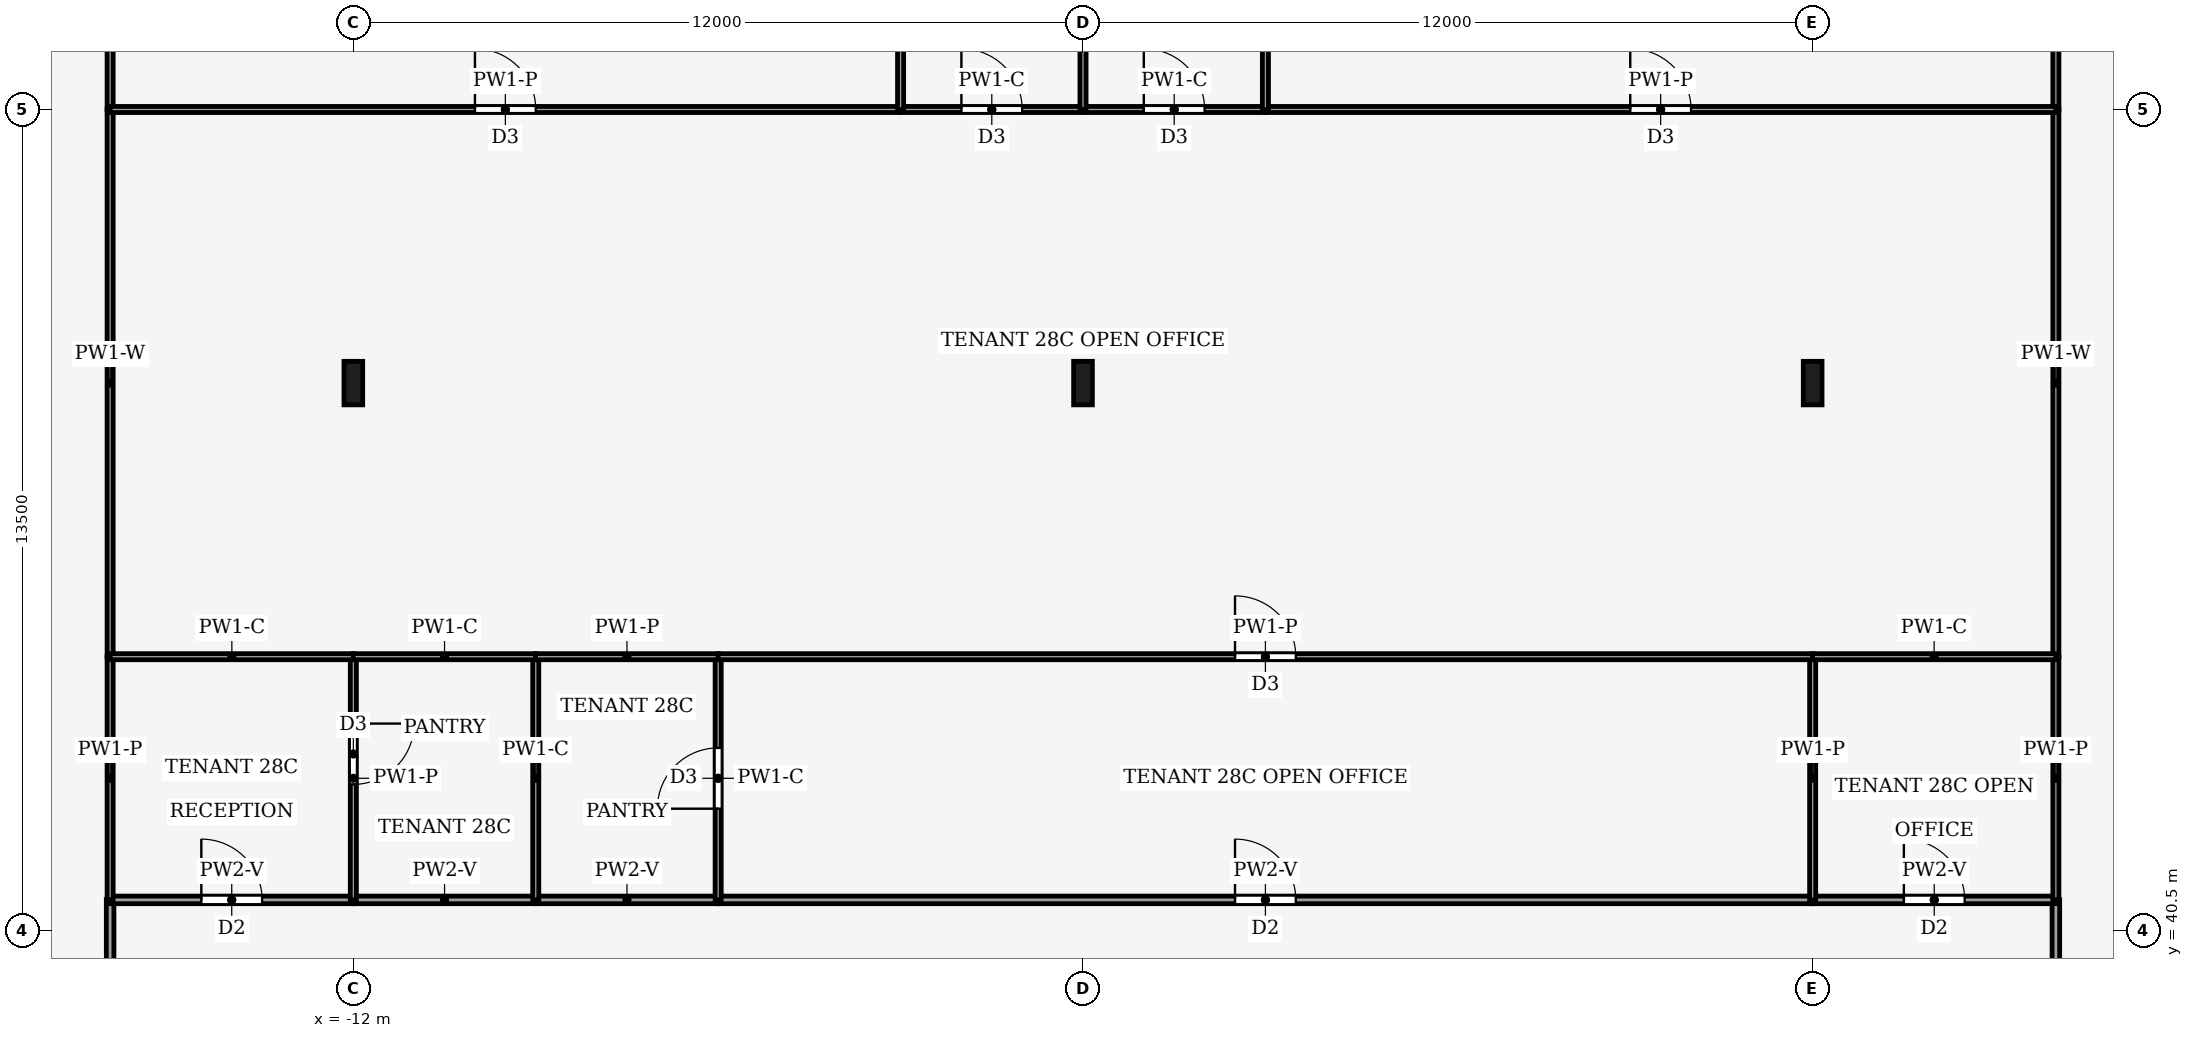
"""IFC4 building model, lengths in metres.
Left out: names, types, materials, properties, quantities, classifications, styles, units other than length and angle.
Written with IfcOpenShell. Run it as: python <this file> out.ifc"""

import sys

from ifc_helpers import new_model, si_unit, direction, frame, frame_2d, origin, origin_2d, place, context, subcontext, project, spatial, rectangle, i_section, extrude, element, fill, save


model = new_model("IFC4")
c1 = context("Model", 3, precision=1e-05, world=origin(), true_north=direction((0.0, 1.0)))
c2 = subcontext(c1, "Body", "Model", "MODEL_VIEW")
j1 = project(units=[si_unit("LENGTHUNIT", "METRE"), si_unit("PLANEANGLEUNIT", "RADIAN")], contexts=[c1])
p1 = place(None, origin())
s1 = spatial("IfcSite", under=j1, at=p1, CompositionType="ELEMENT")
p2 = place(p1, origin())
s2 = spatial("IfcBuilding", under=s1, at=p2, CompositionType="ELEMENT")
p3 = place(p2, frame((0.0, 0.0, 126.0)))
s3 = spatial("IfcBuildingStorey", under=s2, at=p3, CompositionType="ELEMENT", Elevation=126.0)
for number, where, z_axis, x_axis in (
    (1, (-12.0, 49.5, 0.0), (0.0, 0.0, 1.0), (1.0, 0.0, 0.0)),
    (2, (0.0, 49.5, 0.0), (0.0, 0.0, 1.0), (1.0, 0.0, 0.0)),
    (3, (12.0, 49.5, 0.0), (0.0, 0.0, 1.0), (1.0, 0.0, 0.0)),
):
    element("IfcColumn", number, at=place(p3, frame(where, z_axis=z_axis, x_axis=x_axis)), inside=s3, PredefinedType="COLUMN", context=c2, shape_type="SweptSolid", body=[
        extrude(i_section(OverallWidth=0.308, OverallDepth=0.716, WebThickness=0.021, FlangeThickness=0.04, FilletRadius=0.027, at=origin_2d()), origin(), (0.0, 0.0, 1.0), 4.0),
    ])
p4 = place(p3, frame((-16.0, 36.0, 0.0), z_axis=(0.0, 0.0, 1.0), x_axis=(0.0, 1.0, 0.0)))
e4 = element("IfcWall", 4, at=p4, inside=s3, PredefinedType="PARTITIONING", context=c2, shape_type="SweptSolid", body=[
    extrude(rectangle(XDim=5.004, YDim=0.125, at=frame_2d((2.502, 0.0))), origin(), (0.0, 0.0, 1.0), 3.14),
])
p5 = place(p4, frame((2.002, 0.0, 0.0)))
e5 = element("IfcOpeningElement", 5, at=p5, cuts=e4, PredefinedType="OPENING", context=c2, shape_type="SweptSolid", body=[
    extrude(rectangle(XDim=1.0, YDim=2.1, at=frame_2d((0.5, 1.05))), frame((0.0, 0.073, 0.0), z_axis=(0.0, -1.0, 0.0), x_axis=(1.0, 0.0, 0.0)), (0.0, 0.0, 1.0), 0.145),
])
p6 = place(p3, frame((16.0, 41.004, 0.0), z_axis=(0.0, 0.0, 1.0), x_axis=(0.0, -1.0, 0.0)))
e6 = element("IfcWall", 6, at=p6, inside=s3, PredefinedType="PARTITIONING", context=c2, shape_type="SweptSolid", body=[
    extrude(rectangle(XDim=5.004, YDim=0.125, at=frame_2d((2.502, 0.0))), origin(), (0.0, 0.0, 1.0), 3.14),
])
p7 = place(p6, frame((2.002, 0.0, 0.0)))
e7 = element("IfcOpeningElement", 7, at=p7, cuts=e6, PredefinedType="OPENING", context=c2, shape_type="SweptSolid", body=[
    extrude(rectangle(XDim=1.0, YDim=2.1, at=frame_2d((0.5, 1.05))), frame((0.0, 0.073, 0.0), z_axis=(0.0, -1.0, 0.0), x_axis=(1.0, 0.0, 0.0)), (0.0, 0.0, 1.0), 0.145),
])
p8 = place(p3, frame((-16.0, 41.0, 0.0), z_axis=(0.0, 0.0, 1.0), x_axis=(1.0, 0.0, 0.0)))
e8 = element("IfcWall", 8, at=p8, inside=s3, PredefinedType="PARTITIONING", context=c2, shape_type="SweptSolid", body=[
    extrude(rectangle(XDim=4.0, YDim=0.125, at=frame_2d((2.0, 0.0))), origin(), (0.0, 0.0, 1.0), 3.44),
])
p9 = place(p8, frame((1.5, 0.0, 0.0)))
e9 = element("IfcOpeningElement", 9, at=p9, cuts=e8, PredefinedType="OPENING", context=c2, shape_type="SweptSolid", body=[
    extrude(rectangle(XDim=1.0, YDim=2.1, at=frame_2d((0.5, 1.05))), frame((0.0, 0.073, 0.0), z_axis=(0.0, -1.0, 0.0), x_axis=(1.0, 0.0, 0.0)), (0.0, 0.0, 1.0), 0.145),
])
for number, where, z_axis, x_axis in (
    (10, (-9.0, 41.0, 0.0), (0.0, 0.0, 1.0), (-1.0, 0.0, 0.0)),
    (11, (-6.0, 41.0, 0.0), (0.0, 0.0, 1.0), (-1.0, 0.0, 0.0)),
):
    element("IfcWall", number, at=place(p3, frame(where, z_axis=z_axis, x_axis=x_axis)), inside=s3, PredefinedType="PARTITIONING", context=c2, shape_type="SweptSolid", body=[
        extrude(rectangle(XDim=3.0, YDim=0.125, at=frame_2d((1.5, 0.0))), origin(), (0.0, 0.0, 1.0), 3.44),
    ])
p10 = place(p3, frame((-6.0, 41.0, 0.0), z_axis=(0.0, 0.0, 1.0), x_axis=(1.0, 0.0, 0.0)))
e12 = element("IfcWall", 12, at=p10, inside=s3, PredefinedType="PARTITIONING", context=c2, shape_type="SweptSolid", body=[
    extrude(rectangle(XDim=18.0, YDim=0.125, at=frame_2d((9.0, 0.0))), origin(), (0.0, 0.0, 1.0), 3.44),
])
p11 = place(p10, frame((8.5, 0.0, 0.0)))
e13 = element("IfcOpeningElement", 13, at=p11, cuts=e12, PredefinedType="OPENING", context=c2, shape_type="SweptSolid", body=[
    extrude(rectangle(XDim=1.0, YDim=2.1, at=frame_2d((0.5, 1.05))), frame((0.0, 0.073, 0.0), z_axis=(0.0, -1.0, 0.0), x_axis=(1.0, 0.0, 0.0)), (0.0, 0.0, 1.0), 0.145),
])
p12 = place(p3, frame((12.0, 41.0, 0.0), z_axis=(0.0, 0.0, 1.0), x_axis=(1.0, 0.0, 0.0)))
e14 = element("IfcWall", 14, at=p12, inside=s3, PredefinedType="PARTITIONING", context=c2, shape_type="SweptSolid", body=[
    extrude(rectangle(XDim=4.0, YDim=0.125, at=frame_2d((2.0, 0.0))), origin(), (0.0, 0.0, 1.0), 3.44),
])
p13 = place(p12, frame((1.5, 0.0, 0.0)))
e15 = element("IfcOpeningElement", 15, at=p13, cuts=e14, PredefinedType="OPENING", context=c2, shape_type="SweptSolid", body=[
    extrude(rectangle(XDim=1.0, YDim=2.1, at=frame_2d((0.5, 1.05))), frame((0.0, 0.073, 0.0), z_axis=(0.0, -1.0, 0.0), x_axis=(1.0, 0.0, 0.0)), (0.0, 0.0, 1.0), 0.145),
])
p14 = place(p3, frame((-16.0, 41.0, 0.0), z_axis=(0.0, 0.0, 1.0), x_axis=(0.0, 1.0, 0.0)))
e16 = element("IfcWall", 16, at=p14, inside=s3, PredefinedType="PARTITIONING", context=c2, shape_type="SweptSolid", body=[
    extrude(rectangle(XDim=4.0, YDim=0.1, at=frame_2d((2.0, 0.0))), origin(), (0.0, 0.0, 1.0), 3.44),
])
p15 = place(p3, frame((-16.0, 45.0, 0.0), z_axis=(0.0, 0.0, 1.0), x_axis=(0.0, 1.0, 0.0)))
e17 = element("IfcWall", 17, at=p15, inside=s3, PredefinedType="PARTITIONING", context=c2, shape_type="SweptSolid", body=[
    extrude(rectangle(XDim=9.0, YDim=0.1, at=frame_2d((4.5, 0.0))), origin(), (0.0, 0.0, 1.0), 3.24),
])
p16 = place(p3, frame((-16.0, 54.0, 0.0), z_axis=(0.0, 0.0, 1.0), x_axis=(0.0, 1.0, 0.0)))
e18 = element("IfcWall", 18, at=p16, inside=s3, PredefinedType="PARTITIONING", context=c2, shape_type="SweptSolid", body=[
    extrude(rectangle(XDim=6.913, YDim=0.1, at=frame_2d((3.457, 0.0))), origin(), (0.0, 0.0, 1.0), 3.04),
])
p17 = place(p3, frame((16.0, 45.0, 0.0), z_axis=(0.0, 0.0, 1.0), x_axis=(0.0, -1.0, 0.0)))
e19 = element("IfcWall", 19, at=p17, inside=s3, PredefinedType="PARTITIONING", context=c2, shape_type="SweptSolid", body=[
    extrude(rectangle(XDim=4.0, YDim=0.1, at=frame_2d((2.0, 0.0))), origin(), (0.0, 0.0, 1.0), 3.44),
])
p18 = place(p3, frame((16.0, 54.0, 0.0), z_axis=(0.0, 0.0, 1.0), x_axis=(0.0, -1.0, 0.0)))
e20 = element("IfcWall", 20, at=p18, inside=s3, PredefinedType="PARTITIONING", context=c2, shape_type="SweptSolid", body=[
    extrude(rectangle(XDim=9.0, YDim=0.1, at=frame_2d((4.5, 0.0))), origin(), (0.0, 0.0, 1.0), 3.24),
])
p19 = place(p3, frame((16.0, 60.913, 0.0), z_axis=(0.0, 0.0, 1.0), x_axis=(0.0, -1.0, 0.0)))
e21 = element("IfcWall", 21, at=p19, inside=s3, PredefinedType="PARTITIONING", context=c2, shape_type="SweptSolid", body=[
    extrude(rectangle(XDim=6.913, YDim=0.1, at=frame_2d((3.457, 0.0))), origin(), (0.0, 0.0, 1.0), 3.04),
])
p20 = place(p3, frame((-12.0, 45.0, 0.0), z_axis=(0.0, 0.0, 1.0), x_axis=(0.0, -1.0, 0.0)))
e22 = element("IfcWall", 22, at=p20, inside=s3, PredefinedType="PARTITIONING", context=c2, shape_type="SweptSolid", body=[
    extrude(rectangle(XDim=4.0, YDim=0.1, at=frame_2d((2.0, 0.0))), origin(), (0.0, 0.0, 1.0), 3.44),
])
p21 = place(p20, frame((1.1, 0.0, 0.0)))
e23 = element("IfcOpeningElement", 23, at=p21, cuts=e22, PredefinedType="OPENING", context=c2, shape_type="SweptSolid", body=[
    extrude(rectangle(XDim=1.0, YDim=2.1, at=frame_2d((0.5, 1.05))), frame((0.0, 0.06, 0.0), z_axis=(0.0, -1.0, 0.0), x_axis=(1.0, 0.0, 0.0)), (0.0, 0.0, 1.0), 0.12),
])
p22 = place(p3, frame((-11.996, 45.0, 0.0), z_axis=(0.0, 0.0, 1.0), x_axis=(-1.0, 0.0, 0.0)))
e24 = element("IfcWall", 24, at=p22, inside=s3, PredefinedType="PARTITIONING", context=c2, shape_type="SweptSolid", body=[
    extrude(rectangle(XDim=4.004, YDim=0.1, at=frame_2d((2.002, 0.0))), origin(), (0.0, 0.0, 1.0), 3.87),
])
p23 = place(p3, frame((-9.0, 41.0, 0.0), z_axis=(0.0, 0.0, 1.0), x_axis=(0.0, 1.0, 0.0)))
e25 = element("IfcWall", 25, at=p23, inside=s3, PredefinedType="PARTITIONING", context=c2, shape_type="SweptSolid", body=[
    extrude(rectangle(XDim=4.0, YDim=0.1, at=frame_2d((2.0, 0.0))), origin(), (0.0, 0.0, 1.0), 3.87),
])
p24 = place(p3, frame((-8.996, 45.0, 0.0), z_axis=(0.0, 0.0, 1.0), x_axis=(-1.0, 0.0, 0.0)))
e26 = element("IfcWall", 26, at=p24, inside=s3, PredefinedType="PARTITIONING", context=c2, shape_type="SweptSolid", body=[
    extrude(rectangle(XDim=3.008, YDim=0.1, at=frame_2d((1.504, 0.0))), origin(), (0.0, 0.0, 1.0), 3.87),
])
p25 = place(p3, frame((-6.0, 41.0, 0.0), z_axis=(0.0, 0.0, 1.0), x_axis=(0.0, 1.0, 0.0)))
e27 = element("IfcWall", 27, at=p25, inside=s3, PredefinedType="PARTITIONING", context=c2, shape_type="SweptSolid", body=[
    extrude(rectangle(XDim=4.0, YDim=0.1, at=frame_2d((2.0, 0.0))), origin(), (0.0, 0.0, 1.0), 3.87),
])
p26 = place(p25, frame((1.5, 0.0, 0.0)))
e28 = element("IfcOpeningElement", 28, at=p26, cuts=e27, PredefinedType="OPENING", context=c2, shape_type="SweptSolid", body=[
    extrude(rectangle(XDim=1.0, YDim=2.1, at=frame_2d((0.5, 1.05))), frame((0.0, 0.06, 0.0), z_axis=(0.0, -1.0, 0.0), x_axis=(1.0, 0.0, 0.0)), (0.0, 0.0, 1.0), 0.12),
])
p27 = place(p3, frame((-5.996, 45.0, 0.0), z_axis=(0.0, 0.0, 1.0), x_axis=(-1.0, 0.0, 0.0)))
e29 = element("IfcWall", 29, at=p27, inside=s3, PredefinedType="PARTITIONING", context=c2, shape_type="SweptSolid", body=[
    extrude(rectangle(XDim=3.008, YDim=0.1, at=frame_2d((1.504, 0.0))), origin(), (0.0, 0.0, 1.0), 3.44),
])
p28 = place(p3, frame((12.0, 41.0, 0.0), z_axis=(0.0, 0.0, 1.0), x_axis=(0.0, 1.0, 0.0)))
e30 = element("IfcWall", 30, at=p28, inside=s3, PredefinedType="PARTITIONING", context=c2, shape_type="SweptSolid", body=[
    extrude(rectangle(XDim=4.0, YDim=0.1, at=frame_2d((2.0, 0.0))), origin(), (0.0, 0.0, 1.0), 3.44),
])
p29 = place(p3, frame((-6.004, 45.0, 0.0), z_axis=(0.0, 0.0, 1.0), x_axis=(1.0, 0.0, 0.0)))
e31 = element("IfcWall", 31, at=p29, inside=s3, PredefinedType="PARTITIONING", context=c2, shape_type="SweptSolid", body=[
    extrude(rectangle(XDim=18.008, YDim=0.1, at=frame_2d((9.004, 0.0))), origin(), (0.0, 0.0, 1.0), 3.44),
])
p30 = place(p29, frame((8.504, 0.0, 0.0)))
e32 = element("IfcOpeningElement", 32, at=p30, cuts=e31, PredefinedType="OPENING", context=c2, shape_type="SweptSolid", body=[
    extrude(rectangle(XDim=1.0, YDim=2.1, at=frame_2d((0.5, 1.05))), frame((0.0, 0.06, 0.0), z_axis=(0.0, -1.0, 0.0), x_axis=(1.0, 0.0, 0.0)), (0.0, 0.0, 1.0), 0.12),
])
p31 = place(p3, frame((16.0, 45.0, 0.0), z_axis=(0.0, 0.0, 1.0), x_axis=(-1.0, 0.0, 0.0)))
e33 = element("IfcWall", 33, at=p31, inside=s3, PredefinedType="PARTITIONING", context=c2, shape_type="SweptSolid", body=[
    extrude(rectangle(XDim=4.004, YDim=0.1, at=frame_2d((2.002, 0.0))), origin(), (0.0, 0.0, 1.0), 3.87),
])
p32 = place(p3, frame((-16.0, 54.0, 0.0), z_axis=(0.0, 0.0, 1.0), x_axis=(1.0, 0.0, 0.0)))
e34 = element("IfcWall", 34, at=p32, inside=s3, PredefinedType="PARTITIONING", context=c2, shape_type="SweptSolid", body=[
    extrude(rectangle(XDim=13.0, YDim=0.1, at=frame_2d((6.5, 0.0))), origin(), (0.0, 0.0, 1.0), 3.44),
])
p33 = place(p32, frame((6.0, 0.0, 0.0)))
e35 = element("IfcOpeningElement", 35, at=p33, cuts=e34, PredefinedType="OPENING", context=c2, shape_type="SweptSolid", body=[
    extrude(rectangle(XDim=1.0, YDim=2.1, at=frame_2d((0.5, 1.05))), frame((0.0, 0.06, 0.0), z_axis=(0.0, -1.0, 0.0), x_axis=(1.0, 0.0, 0.0)), (0.0, 0.0, 1.0), 0.12),
])
p34 = place(p3, frame((-3.0, 54.0, 0.0), z_axis=(0.0, 0.0, 1.0), x_axis=(1.0, 0.0, 0.0)))
e36 = element("IfcWall", 36, at=p34, inside=s3, PredefinedType="PARTITIONING", context=c2, shape_type="SweptSolid", body=[
    extrude(rectangle(XDim=3.0, YDim=0.1, at=frame_2d((1.5, 0.0))), origin(), (0.0, 0.0, 1.0), 3.87),
])
p35 = place(p34, frame((1.0, 0.0, 0.0)))
e37 = element("IfcOpeningElement", 37, at=p35, cuts=e36, PredefinedType="OPENING", context=c2, shape_type="SweptSolid", body=[
    extrude(rectangle(XDim=1.0, YDim=2.1, at=frame_2d((0.5, 1.05))), frame((0.0, 0.06, 0.0), z_axis=(0.0, -1.0, 0.0), x_axis=(1.0, 0.0, 0.0)), (0.0, 0.0, 1.0), 0.12),
])
p36 = place(p3, frame((0.0, 54.0, 0.0), z_axis=(0.0, 0.0, 1.0), x_axis=(1.0, 0.0, 0.0)))
e38 = element("IfcWall", 38, at=p36, inside=s3, PredefinedType="PARTITIONING", context=c2, shape_type="SweptSolid", body=[
    extrude(rectangle(XDim=3.0, YDim=0.1, at=frame_2d((1.5, 0.0))), origin(), (0.0, 0.0, 1.0), 3.87),
])
p37 = place(p36, frame((1.0, 0.0, 0.0)))
e39 = element("IfcOpeningElement", 39, at=p37, cuts=e38, PredefinedType="OPENING", context=c2, shape_type="SweptSolid", body=[
    extrude(rectangle(XDim=1.0, YDim=2.1, at=frame_2d((0.5, 1.05))), frame((0.0, 0.06, 0.0), z_axis=(0.0, -1.0, 0.0), x_axis=(1.0, 0.0, 0.0)), (0.0, 0.0, 1.0), 0.12),
])
p38 = place(p3, frame((3.0, 54.0, 0.0), z_axis=(0.0, 0.0, 1.0), x_axis=(1.0, 0.0, 0.0)))
e40 = element("IfcWall", 40, at=p38, inside=s3, PredefinedType="PARTITIONING", context=c2, shape_type="SweptSolid", body=[
    extrude(rectangle(XDim=13.0, YDim=0.1, at=frame_2d((6.5, 0.0))), origin(), (0.0, 0.0, 1.0), 3.44),
])
p39 = place(p38, frame((6.0, 0.0, 0.0)))
e41 = element("IfcOpeningElement", 41, at=p39, cuts=e40, PredefinedType="OPENING", context=c2, shape_type="SweptSolid", body=[
    extrude(rectangle(XDim=1.0, YDim=2.1, at=frame_2d((0.5, 1.05))), frame((0.0, 0.06, 0.0), z_axis=(0.0, -1.0, 0.0), x_axis=(1.0, 0.0, 0.0)), (0.0, 0.0, 1.0), 0.12),
])
p40 = place(p3, frame((-3.0, 54.0, 0.0), z_axis=(0.0, 0.0, 1.0), x_axis=(0.0, 1.0, 0.0)))
e42 = element("IfcWall", 42, at=p40, inside=s3, PredefinedType="PARTITIONING", context=c2, shape_type="SweptSolid", body=[
    extrude(rectangle(XDim=5.83, YDim=0.1, at=frame_2d((2.915, 0.0))), origin(), (0.0, 0.0, 1.0), 3.04),
])
p41 = place(p3, frame((0.0, 54.0, 0.0), z_axis=(0.0, 0.0, 1.0), x_axis=(0.0, 1.0, 0.0)))
e43 = element("IfcWall", 43, at=p41, inside=s3, PredefinedType="PARTITIONING", context=c2, shape_type="SweptSolid", body=[
    extrude(rectangle(XDim=5.58, YDim=0.1, at=frame_2d((2.79, 0.0))), origin(), (0.0, 0.0, 1.0), 3.04),
])
p42 = place(p3, frame((3.0, 54.0, 0.0), z_axis=(0.0, 0.0, 1.0), x_axis=(0.0, 1.0, 0.0)))
e44 = element("IfcWall", 44, at=p42, inside=s3, PredefinedType="PARTITIONING", context=c2, shape_type="SweptSolid", body=[
    extrude(rectangle(XDim=5.83, YDim=0.1, at=frame_2d((2.915, 0.0))), origin(), (0.0, 0.0, 1.0), 3.04),
])
p43 = place(p9, origin())
e45 = element("IfcDoor", 45, at=p43, inside=s3, OperationType="SINGLE_SWING_RIGHT", PredefinedType="DOOR", context=c2, shape_type="SweptSolid", body=[
    extrude(rectangle(XDim=1.0, YDim=2.1, at=frame_2d((0.5, 1.05))), frame((0.0, 0.025, 0.0), z_axis=(0.0, -1.0, 0.0), x_axis=(1.0, 0.0, 0.0)), (0.0, 0.0, 1.0), 0.05),
])
fill(e9, e45)
p44 = place(p11, origin())
e46 = element("IfcDoor", 46, at=p44, inside=s3, OperationType="SINGLE_SWING_LEFT", PredefinedType="DOOR", context=c2, shape_type="SweptSolid", body=[
    extrude(rectangle(XDim=1.0, YDim=2.1, at=frame_2d((0.5, 1.05))), frame((0.0, 0.025, 0.0), z_axis=(0.0, -1.0, 0.0), x_axis=(1.0, 0.0, 0.0)), (0.0, 0.0, 1.0), 0.05),
])
fill(e13, e46)
p45 = place(p13, origin())
e47 = element("IfcDoor", 47, at=p45, inside=s3, OperationType="SINGLE_SWING_RIGHT", PredefinedType="DOOR", context=c2, shape_type="SweptSolid", body=[
    extrude(rectangle(XDim=1.0, YDim=2.1, at=frame_2d((0.5, 1.05))), frame((0.0, 0.025, 0.0), z_axis=(0.0, -1.0, 0.0), x_axis=(1.0, 0.0, 0.0)), (0.0, 0.0, 1.0), 0.05),
])
fill(e15, e47)
p46 = place(p21, origin())
e48 = element("IfcDoor", 48, at=p46, inside=s3, OperationType="SINGLE_SWING_LEFT", PredefinedType="DOOR", context=c2, shape_type="SweptSolid", body=[
    extrude(rectangle(XDim=1.0, YDim=2.1, at=frame_2d((0.5, 1.05))), frame((0.0, 0.025, 0.0), z_axis=(0.0, -1.0, 0.0), x_axis=(1.0, 0.0, 0.0)), (0.0, 0.0, 1.0), 0.05),
])
fill(e23, e48)
p47 = place(p26, origin())
e49 = element("IfcDoor", 49, at=p47, inside=s3, OperationType="SINGLE_SWING_RIGHT", PredefinedType="DOOR", context=c2, shape_type="SweptSolid", body=[
    extrude(rectangle(XDim=1.0, YDim=2.1, at=frame_2d((0.5, 1.05))), frame((0.0, 0.025, 0.0), z_axis=(0.0, -1.0, 0.0), x_axis=(1.0, 0.0, 0.0)), (0.0, 0.0, 1.0), 0.05),
])
fill(e28, e49)
p48 = place(p30, origin())
e50 = element("IfcDoor", 50, at=p48, inside=s3, OperationType="SINGLE_SWING_LEFT", PredefinedType="DOOR", context=c2, shape_type="SweptSolid", body=[
    extrude(rectangle(XDim=1.0, YDim=2.1, at=frame_2d((0.5, 1.05))), frame((0.0, 0.025, 0.0), z_axis=(0.0, -1.0, 0.0), x_axis=(1.0, 0.0, 0.0)), (0.0, 0.0, 1.0), 0.05),
])
fill(e32, e50)
p49 = place(p33, origin())
e51 = element("IfcDoor", 51, at=p49, inside=s3, OperationType="SINGLE_SWING_RIGHT", PredefinedType="DOOR", context=c2, shape_type="SweptSolid", body=[
    extrude(rectangle(XDim=1.0, YDim=2.1, at=frame_2d((0.5, 1.05))), frame((0.0, 0.025, 0.0), z_axis=(0.0, -1.0, 0.0), x_axis=(1.0, 0.0, 0.0)), (0.0, 0.0, 1.0), 0.05),
])
fill(e35, e51)
p50 = place(p35, origin())
e52 = element("IfcDoor", 52, at=p50, inside=s3, OperationType="SINGLE_SWING_LEFT", PredefinedType="DOOR", context=c2, shape_type="SweptSolid", body=[
    extrude(rectangle(XDim=1.0, YDim=2.1, at=frame_2d((0.5, 1.05))), frame((0.0, 0.025, 0.0), z_axis=(0.0, -1.0, 0.0), x_axis=(1.0, 0.0, 0.0)), (0.0, 0.0, 1.0), 0.05),
])
fill(e37, e52)
p51 = place(p37, origin())
e53 = element("IfcDoor", 53, at=p51, inside=s3, OperationType="SINGLE_SWING_RIGHT", PredefinedType="DOOR", context=c2, shape_type="SweptSolid", body=[
    extrude(rectangle(XDim=1.0, YDim=2.1, at=frame_2d((0.5, 1.05))), frame((0.0, 0.025, 0.0), z_axis=(0.0, -1.0, 0.0), x_axis=(1.0, 0.0, 0.0)), (0.0, 0.0, 1.0), 0.05),
])
fill(e39, e53)
p52 = place(p39, origin())
e54 = element("IfcDoor", 54, at=p52, inside=s3, OperationType="SINGLE_SWING_LEFT", PredefinedType="DOOR", context=c2, shape_type="SweptSolid", body=[
    extrude(rectangle(XDim=1.0, YDim=2.1, at=frame_2d((0.5, 1.05))), frame((0.0, 0.025, 0.0), z_axis=(0.0, -1.0, 0.0), x_axis=(1.0, 0.0, 0.0)), (0.0, 0.0, 1.0), 0.05),
])
fill(e41, e54)
save(model, sys.argv[1])
